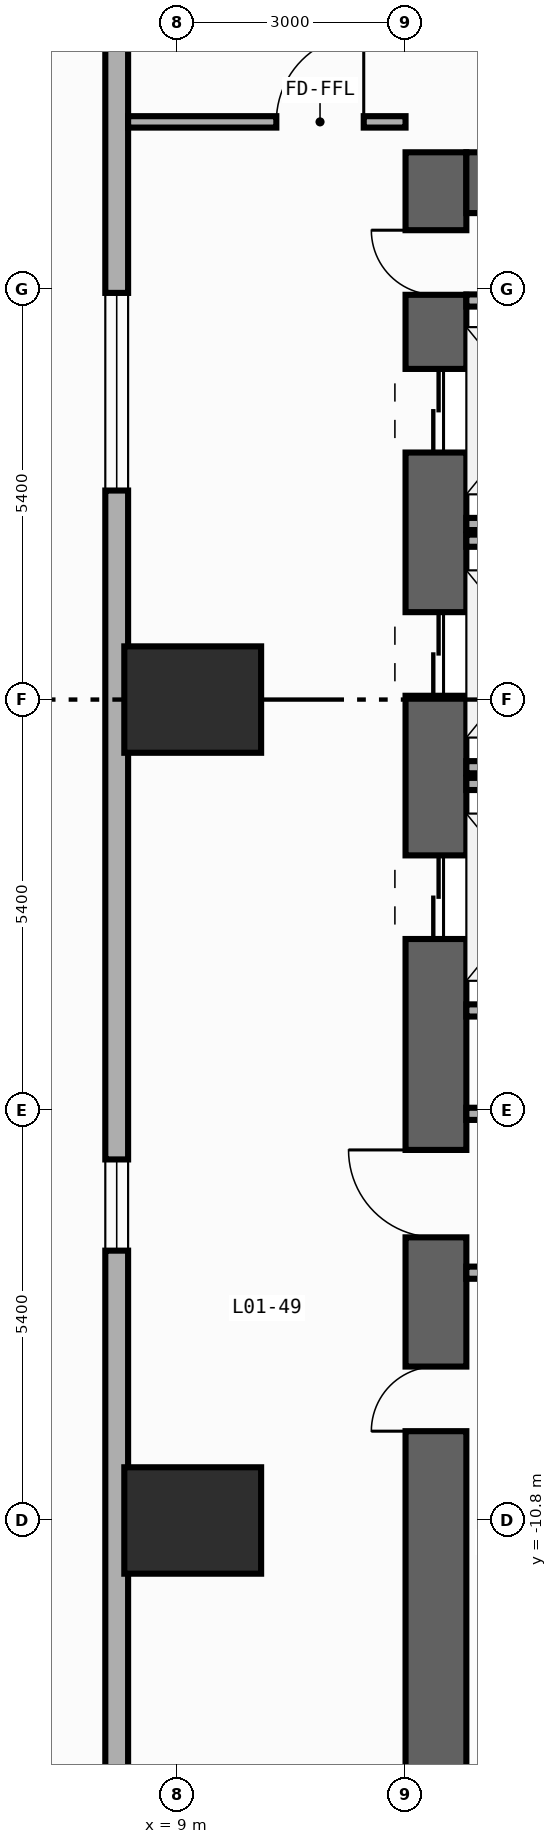
"""IFC4 building model, lengths in metres.
Left out: names, types, materials, properties, quantities, classifications, styles, units other than length and angle.
Written with IfcOpenShell. Run it as: python <this file> out.ifc"""

import sys

from ifc_helpers import new_model, si_unit, direction, frame, frame_2d, origin, origin_2d, place, context, subcontext, project, spatial, rectangle, extrude, element, fill, save


model = new_model("IFC4")
c1 = context("Model", 3, precision=1e-05, world=origin(), true_north=direction((0.0, 1.0)))
c2 = subcontext(c1, "Body", "Model", "MODEL_VIEW")
j1 = project(units=[si_unit("LENGTHUNIT", "METRE"), si_unit("PLANEANGLEUNIT", "RADIAN")], contexts=[c1])
p1 = place(None, origin())
s1 = spatial("IfcSite", under=j1, at=p1, CompositionType="ELEMENT")
p2 = place(p1, origin())
s2 = spatial("IfcBuilding", under=s1, at=p2, CompositionType="ELEMENT")
p3 = place(p2, origin())
s3 = spatial("IfcBuildingStorey", under=s2, at=p3, CompositionType="ELEMENT", Elevation=0.0)
p4 = place(p3, frame((12.4, -19.8, 0.0), z_axis=(0.0, 0.0, 1.0), x_axis=(0.0, 1.0, 0.0)))
e1 = element("IfcWall", 1, at=p4, inside=s3, PredefinedType="SHEAR", context=c2, shape_type="SweptSolid", body=[
    extrude(rectangle(XDim=27.0, YDim=0.8, at=frame_2d((13.5, 0.0))), origin(), (0.0, 0.0, 1.0), 5.7),
])
p5 = place(p4, frame((23.05, 0.0, 0.0)))
e2 = element("IfcOpeningElement", 2, at=p5, cuts=e1, PredefinedType="OPENING", context=c2, shape_type="SweptSolid", body=[
    extrude(rectangle(XDim=1.1, YDim=2.2, at=frame_2d((0.55, 1.1))), frame((0.0, 0.41, 0.0), z_axis=(0.0, -1.0, 0.0), x_axis=(1.0, 0.0, 0.0)), (0.0, 0.0, 1.0), 0.82),
])
p6 = place(p4, frame((19.85, 0.0, 0.0)))
e3 = element("IfcOpeningElement", 3, at=p6, cuts=e1, PredefinedType="OPENING", context=c2, shape_type="SweptSolid", body=[
    extrude(rectangle(XDim=1.1, YDim=2.2, at=frame_2d((0.55, 1.1))), frame((0.0, 0.41, 0.0), z_axis=(0.0, -1.0, 0.0), x_axis=(1.0, 0.0, 0.0)), (0.0, 0.0, 1.0), 0.82),
])
p7 = place(p4, frame((16.65, 0.0, 0.0)))
e4 = element("IfcOpeningElement", 4, at=p7, cuts=e1, PredefinedType="OPENING", context=c2, shape_type="SweptSolid", body=[
    extrude(rectangle(XDim=1.1, YDim=2.2, at=frame_2d((0.55, 1.1))), frame((0.0, 0.41, 0.0), z_axis=(0.0, -1.0, 0.0), x_axis=(1.0, 0.0, 0.0)), (0.0, 0.0, 1.0), 0.82),
])
p8 = place(p4, frame((10.175, 0.0, 0.0)))
e5 = element("IfcOpeningElement", 5, at=p8, cuts=e1, PredefinedType="OPENING", context=c2, shape_type="SweptSolid", body=[
    extrude(rectangle(XDim=0.85, YDim=2.1, at=frame_2d((0.425, 1.05))), frame((0.0, 0.41, 0.0), z_axis=(0.0, -1.0, 0.0), x_axis=(1.0, 0.0, 0.0)), (0.0, 0.0, 1.0), 0.82),
])
p9 = place(p4, frame((12.725, 0.0, 0.0)))
e6 = element("IfcOpeningElement", 6, at=p9, cuts=e1, PredefinedType="OPENING", context=c2, shape_type="SweptSolid", body=[
    extrude(rectangle(XDim=1.15, YDim=2.2, at=frame_2d((0.575, 1.1))), frame((0.0, 0.41, 0.0), z_axis=(0.0, -1.0, 0.0), x_axis=(1.0, 0.0, 0.0)), (0.0, 0.0, 1.0), 0.82),
])
p10 = place(p4, frame((25.125, 0.0, 0.0)))
e7 = element("IfcOpeningElement", 7, at=p10, cuts=e1, PredefinedType="OPENING", context=c2, shape_type="SweptSolid", body=[
    extrude(rectangle(XDim=0.85, YDim=2.1, at=frame_2d((0.425, 1.05))), frame((0.0, 0.41, 0.0), z_axis=(0.0, -1.0, 0.0), x_axis=(1.0, 0.0, 0.0)), (0.0, 0.0, 1.0), 0.82),
])
p11 = place(p3, frame((12.8, 6.8, 0.0), z_axis=(0.0, 0.0, 1.0), x_axis=(1.0, 0.0, 0.0)))
e8 = element("IfcWall", 8, at=p11, inside=s3, PredefinedType="SHEAR", context=c2, shape_type="SweptSolid", body=[
    extrude(rectangle(XDim=6.8, YDim=0.8, at=frame_2d((3.4, 0.0))), origin(), (0.0, 0.0, 1.0), 5.7),
])
for number, where, z_axis, x_axis in (
    (9, (9.2, -10.8, 0.0), (0.0, 0.0, 1.0), (1.0, 0.0, 0.0)),
    (10, (9.2, 0.0, 0.0), (0.0, 0.0, 1.0), (1.0, 0.0, 0.0)),
):
    element("IfcColumn", number, at=place(p3, frame(where, z_axis=z_axis, x_axis=x_axis)), inside=s3, PredefinedType="COLUMN", context=c2, shape_type="SweptSolid", body=[
        extrude(rectangle(XDim=1.8, YDim=1.4, at=origin_2d()), origin(), (0.0, 0.0, 1.0), 6.0),
    ])
p12 = place(p3, frame((8.2, -27.25, 0.0), z_axis=(0.0, 0.0, 1.0), x_axis=(0.0, 1.0, 0.0)))
e11 = element("IfcWall", 11, at=p12, inside=s3, PredefinedType="STANDARD", context=c2, shape_type="SweptSolid", body=[
    extrude(rectangle(XDim=54.5, YDim=0.3, at=frame_2d((27.25, 0.0))), origin(), (0.0, 0.0, 1.0), 5.7),
])
p13 = place(p12, frame((4.4, 0.0, 0.0)))
e12 = element("IfcOpeningElement", 12, at=p13, cuts=e11, PredefinedType="OPENING", context=c2, shape_type="SweptSolid", body=[
    extrude(rectangle(XDim=2.0, YDim=2.4, at=frame_2d((1.0, 1.2))), frame((0.0, 0.16, 0.0), z_axis=(0.0, -1.0, 0.0), x_axis=(1.0, 0.0, 0.0)), (0.0, 0.0, 1.0), 0.32),
])
p14 = place(p12, frame((20.0, 0.0, 0.85)))
e13 = element("IfcOpeningElement", 13, at=p14, cuts=e11, PredefinedType="OPENING", context=c2, shape_type="SweptSolid", body=[
    extrude(rectangle(XDim=1.2, YDim=1.65, at=frame_2d((0.6, 0.825))), frame((0.0, 0.16, 0.0), z_axis=(0.0, -1.0, 0.0), x_axis=(1.0, 0.0, 0.0)), (0.0, 0.0, 1.0), 0.32),
])
p15 = place(p12, frame((30.0, 0.0, 0.85)))
e14 = element("IfcOpeningElement", 14, at=p15, cuts=e11, PredefinedType="OPENING", context=c2, shape_type="SweptSolid", body=[
    extrude(rectangle(XDim=2.6, YDim=1.95, at=frame_2d((1.3, 0.975))), frame((0.0, 0.16, 0.0), z_axis=(0.0, -1.0, 0.0), x_axis=(1.0, 0.0, 0.0)), (0.0, 0.0, 1.0), 0.32),
])
for number, where, z_axis, x_axis in (
    (15, (12.8, 2.31, 0.0), (0.0, 0.0, 1.0), (1.0, 0.0, 0.0)),
    (16, (12.8, -0.89, 0.0), (0.0, 0.0, 1.0), (1.0, 0.0, 0.0)),
    (17, (12.8, 2.09, 0.0), (0.0, 0.0, 1.0), (1.0, 0.0, 0.0)),
    (18, (12.8, -4.09, 0.0), (0.0, 0.0, 1.0), (1.0, 0.0, 0.0)),
    (19, (12.8, -1.11, 0.0), (0.0, 0.0, 1.0), (1.0, 0.0, 0.0)),
):
    element("IfcWall", number, at=place(p3, frame(where, z_axis=z_axis, x_axis=x_axis)), inside=s3, PredefinedType="STANDARD", context=c2, shape_type="SweptSolid", body=[
        extrude(rectangle(XDim=2.19, YDim=0.16, at=frame_2d((1.095, 0.0))), origin(), (0.0, 0.0, 1.0), 5.7),
    ])
for number, where, z_axis, x_axis in (
    (20, (12.8, -5.45, 0.0), (0.0, 0.0, 1.0), (1.0, 0.0, 0.0)),
    (21, (12.8, -7.54, 0.0), (0.0, 0.0, 1.0), (1.0, 0.0, 0.0)),
    (22, (12.8, 5.25, 0.0), (0.0, 0.0, 1.0), (1.0, 0.0, 0.0)),
):
    element("IfcWall", number, at=place(p3, frame(where, z_axis=z_axis, x_axis=x_axis)), inside=s3, PredefinedType="STANDARD", context=c2, shape_type="SweptSolid", body=[
        extrude(rectangle(XDim=2.6, YDim=0.16, at=frame_2d((1.3, 0.0))), origin(), (0.0, 0.0, 1.0), 5.7),
    ])
p16 = place(p3, frame((8.35, 7.6, 0.0), z_axis=(0.0, 0.0, 1.0), x_axis=(1.0, 0.0, 0.0)))
e23 = element("IfcWall", 23, at=p16, inside=s3, PredefinedType="PARTITIONING", context=c2, shape_type="SweptSolid", body=[
    extrude(rectangle(XDim=3.65, YDim=0.15, at=frame_2d((1.825, 0.0))), origin(), (0.0, 0.0, 1.0), 5.7),
])
p17 = place(p16, frame((1.95, 0.0, 0.0)))
e24 = element("IfcOpeningElement", 24, at=p17, cuts=e23, PredefinedType="OPENING", context=c2, shape_type="SweptSolid", body=[
    extrude(rectangle(XDim=1.15, YDim=2.2, at=frame_2d((0.575, 1.1))), frame((0.0, 0.085, 0.0), z_axis=(0.0, -1.0, 0.0), x_axis=(1.0, 0.0, 0.0)), (0.0, 0.0, 1.0), 0.17),
])
p18 = place(p14, origin())
e25 = element("IfcWindow", 25, at=p18, inside=s3, PartitioningType="SINGLE_PANEL", PredefinedType="WINDOW", context=c2, shape_type="SweptSolid", body=[
    extrude(rectangle(XDim=1.2, YDim=1.65, at=frame_2d((0.6, 0.825))), frame((0.0, 0.03, 0.0), z_axis=(0.0, -1.0, 0.0), x_axis=(1.0, 0.0, 0.0)), (0.0, 0.0, 1.0), 0.06),
])
fill(e13, e25)
p19 = place(p15, origin())
e26 = element("IfcWindow", 26, at=p19, inside=s3, PartitioningType="SINGLE_PANEL", PredefinedType="WINDOW", context=c2, shape_type="SweptSolid", body=[
    extrude(rectangle(XDim=2.6, YDim=1.95, at=frame_2d((1.3, 0.975))), frame((0.0, 0.03, 0.0), z_axis=(0.0, -1.0, 0.0), x_axis=(1.0, 0.0, 0.0)), (0.0, 0.0, 1.0), 0.06),
])
fill(e14, e26)
p20 = place(p5, origin())
e27 = element("IfcDoor", 27, at=p20, inside=s3, OperationType="DOUBLE_DOOR_SLIDING", PredefinedType="DOOR", context=c2, shape_type="SweptSolid", body=[
    extrude(rectangle(XDim=1.1, YDim=2.2, at=frame_2d((0.55, 1.1))), frame((0.0, 0.025, 0.0), z_axis=(0.0, -1.0, 0.0), x_axis=(1.0, 0.0, 0.0)), (0.0, 0.0, 1.0), 0.05),
])
fill(e2, e27)
p21 = place(p6, origin())
e28 = element("IfcDoor", 28, at=p21, inside=s3, OperationType="DOUBLE_DOOR_SLIDING", PredefinedType="DOOR", context=c2, shape_type="SweptSolid", body=[
    extrude(rectangle(XDim=1.1, YDim=2.2, at=frame_2d((0.55, 1.1))), frame((0.0, 0.025, 0.0), z_axis=(0.0, -1.0, 0.0), x_axis=(1.0, 0.0, 0.0)), (0.0, 0.0, 1.0), 0.05),
])
fill(e3, e28)
p22 = place(p7, origin())
e29 = element("IfcDoor", 29, at=p22, inside=s3, OperationType="DOUBLE_DOOR_SLIDING", PredefinedType="DOOR", context=c2, shape_type="SweptSolid", body=[
    extrude(rectangle(XDim=1.1, YDim=2.2, at=frame_2d((0.55, 1.1))), frame((0.0, 0.025, 0.0), z_axis=(0.0, -1.0, 0.0), x_axis=(1.0, 0.0, 0.0)), (0.0, 0.0, 1.0), 0.05),
])
fill(e4, e29)
p23 = place(p8, origin())
e30 = element("IfcDoor", 30, at=p23, inside=s3, OperationType="SINGLE_SWING_LEFT", PredefinedType="DOOR", context=c2, shape_type="SweptSolid", body=[
    extrude(rectangle(XDim=0.85, YDim=2.1, at=frame_2d((0.425, 1.05))), frame((0.0, 0.025, 0.0), z_axis=(0.0, -1.0, 0.0), x_axis=(1.0, 0.0, 0.0)), (0.0, 0.0, 1.0), 0.05),
])
fill(e5, e30)
p24 = place(p9, origin())
e31 = element("IfcDoor", 31, at=p24, inside=s3, OperationType="SINGLE_SWING_RIGHT", PredefinedType="DOOR", context=c2, shape_type="SweptSolid", body=[
    extrude(rectangle(XDim=1.15, YDim=2.2, at=frame_2d((0.575, 1.1))), frame((0.0, 0.025, 0.0), z_axis=(0.0, -1.0, 0.0), x_axis=(1.0, 0.0, 0.0)), (0.0, 0.0, 1.0), 0.05),
])
fill(e6, e31)
p25 = place(p10, origin())
e32 = element("IfcDoor", 32, at=p25, inside=s3, OperationType="SINGLE_SWING_RIGHT", PredefinedType="DOOR", context=c2, shape_type="SweptSolid", body=[
    extrude(rectangle(XDim=0.85, YDim=2.1, at=frame_2d((0.425, 1.05))), frame((0.0, 0.025, 0.0), z_axis=(0.0, -1.0, 0.0), x_axis=(1.0, 0.0, 0.0)), (0.0, 0.0, 1.0), 0.05),
])
fill(e7, e32)
p26 = place(p17, origin())
e33 = element("IfcDoor", 33, at=p26, inside=s3, OperationType="SINGLE_SWING_RIGHT", PredefinedType="DOOR", context=c2, shape_type="SweptSolid", body=[
    extrude(rectangle(XDim=1.15, YDim=2.2, at=frame_2d((0.575, 1.1))), frame((0.0, 0.025, 0.0), z_axis=(0.0, -1.0, 0.0), x_axis=(1.0, 0.0, 0.0)), (0.0, 0.0, 1.0), 0.05),
])
fill(e24, e33)
save(model, sys.argv[1])
